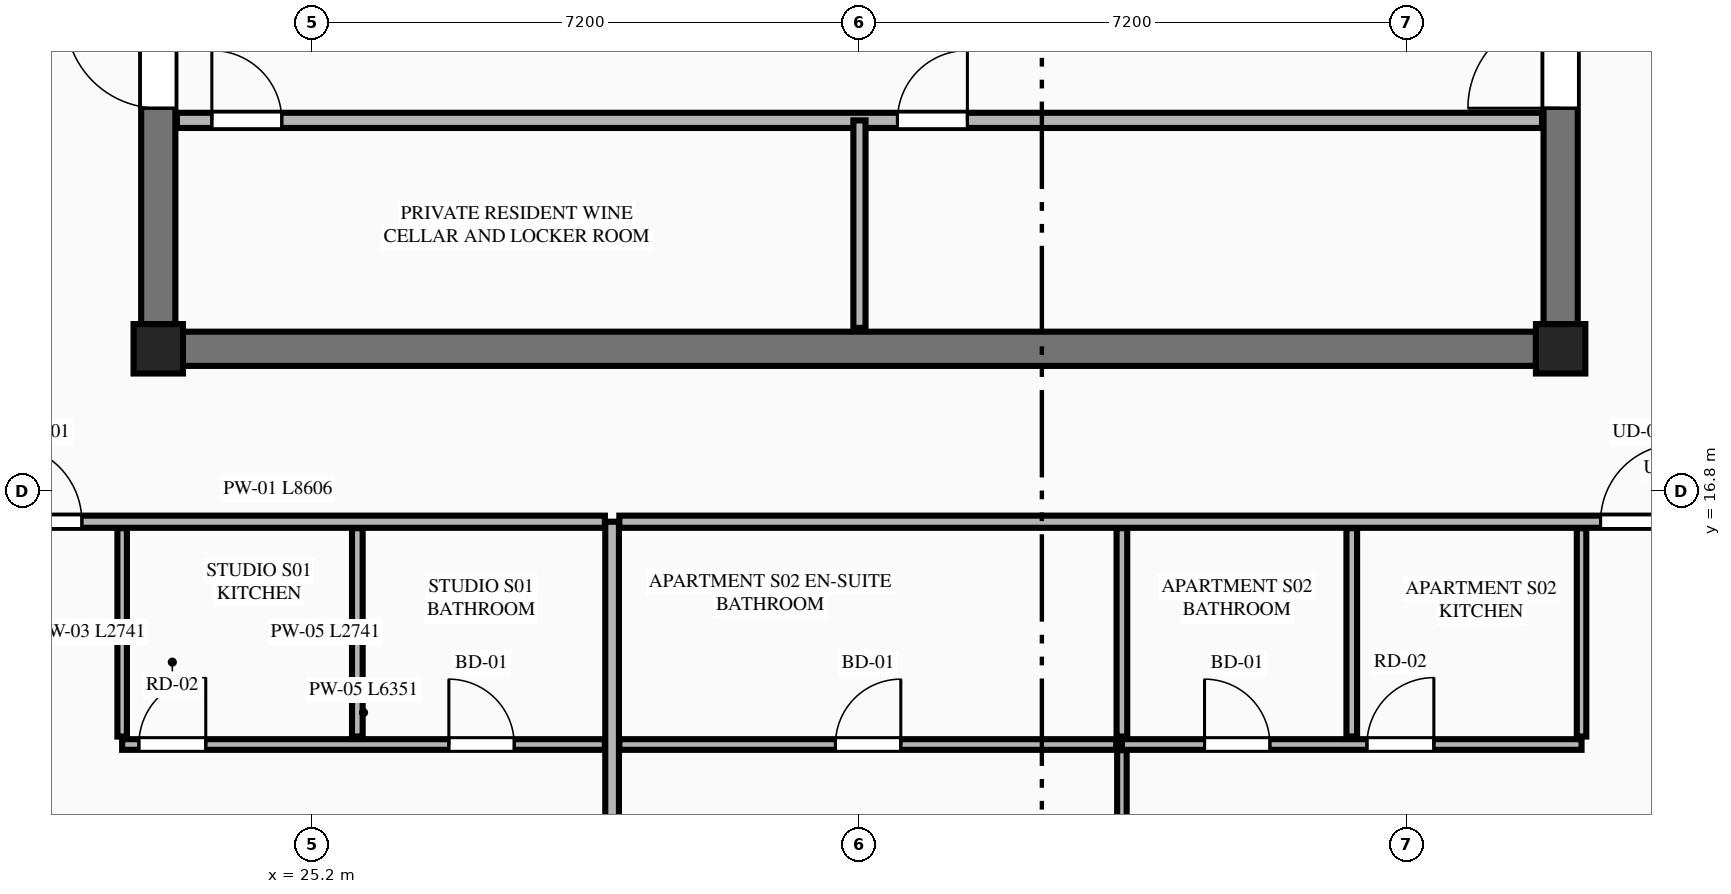
"""IFC4 building model, lengths in metres.
Left out: names, types, materials, properties, quantities, classifications, styles, units other than length and angle.
Written with IfcOpenShell. Run it as: python <this file> out.ifc"""

import sys

from ifc_helpers import new_model, si_unit, direction, frame, frame_2d, origin, origin_2d, place, context, subcontext, project, spatial, rectangle, extrude, element, fill, save


model = new_model("IFC4")
c1 = context("Model", 3, precision=1e-05, world=origin(), true_north=direction((0.0, 1.0)))
c2 = subcontext(c1, "Body", "Model", "MODEL_VIEW")
j1 = project(units=[si_unit("LENGTHUNIT", "METRE"), si_unit("PLANEANGLEUNIT", "RADIAN")], contexts=[c1])
p1 = place(None, origin())
s1 = spatial("IfcSite", under=j1, at=p1, CompositionType="ELEMENT")
p2 = place(p1, origin())
s2 = spatial("IfcBuilding", under=s1, at=p2, CompositionType="ELEMENT")
p3 = place(p2, frame((0.0, 0.0, 283.5)))
s3 = spatial("IfcBuildingStorey", under=s2, at=p3, CompositionType="ELEMENT", Elevation=283.5)
for number, where, z_axis, x_axis in (
    (1, (23.175, 18.675, 0.0), (0.0, 0.0, 1.0), (1.0, 0.0, 0.0)),
    (2, (41.625, 18.675, 0.0), (0.0, 0.0, 1.0), (1.0, 0.0, 0.0)),
):
    element("IfcColumn", number, at=place(p3, frame(where, z_axis=z_axis, x_axis=x_axis)), inside=s3, PredefinedType="COLUMN", context=c2, shape_type="SweptSolid", body=[
        extrude(rectangle(XDim=0.65, YDim=0.65, at=origin_2d()), origin(), (0.0, 0.0, 1.0), 4.0),
    ])
p4 = place(p3, frame((23.5, 18.675, 0.0), z_axis=(0.0, 0.0, 1.0), x_axis=(1.0, 0.0, 0.0)))
e3 = element("IfcWall", 3, at=p4, inside=s3, PredefinedType="SHEAR", context=c2, shape_type="SweptSolid", body=[
    extrude(rectangle(XDim=17.8, YDim=0.45, at=frame_2d((8.9, 0.0))), origin(), (0.0, 0.0, 1.0), 3.8),
])
p5 = place(p3, frame((23.175, 19.0, 0.0), z_axis=(0.0, 0.0, 1.0), x_axis=(0.0, 1.0, 0.0)))
e4 = element("IfcWall", 4, at=p5, inside=s3, PredefinedType="SHEAR", context=c2, shape_type="SweptSolid", body=[
    extrude(rectangle(XDim=13.8, YDim=0.45, at=frame_2d((6.9, 0.0))), origin(), (0.0, 0.0, 1.0), 3.8),
])
p6 = place(p5, frame((2.84, 0.0, 0.0)))
e5 = element("IfcOpeningElement", 5, at=p6, cuts=e4, PredefinedType="OPENING", context=c2, shape_type="SweptSolid", body=[
    extrude(rectangle(XDim=1.22, YDim=2.25, at=frame_2d((0.61, 1.125))), frame((0.0, 0.235, 0.0), z_axis=(0.0, -1.0, 0.0), x_axis=(1.0, 0.0, 0.0)), (0.0, 0.0, 1.0), 0.47),
])
p7 = place(p3, frame((41.625, 19.0, 0.0), z_axis=(0.0, 0.0, 1.0), x_axis=(0.0, 1.0, 0.0)))
e6 = element("IfcWall", 6, at=p7, inside=s3, PredefinedType="SHEAR", context=c2, shape_type="SweptSolid", body=[
    extrude(rectangle(XDim=13.8, YDim=0.45, at=frame_2d((6.9, 0.0))), origin(), (0.0, 0.0, 1.0), 3.8),
])
p8 = place(p7, frame((2.84, 0.0, 0.0)))
e7 = element("IfcOpeningElement", 7, at=p8, cuts=e6, PredefinedType="OPENING", context=c2, shape_type="SweptSolid", body=[
    extrude(rectangle(XDim=1.22, YDim=2.25, at=frame_2d((0.61, 1.125))), frame((0.0, 0.235, 0.0), z_axis=(0.0, -1.0, 0.0), x_axis=(1.0, 0.0, 0.0)), (0.0, 0.0, 1.0), 0.47),
])
p9 = place(p3, frame((23.42, 21.68, 0.0), z_axis=(0.0, 0.0, 1.0), x_axis=(1.0, 0.0, 0.0)))
e8 = element("IfcWall", 8, at=p9, inside=s3, PredefinedType="PLUMBINGWALL", context=c2, shape_type="SweptSolid", body=[
    extrude(rectangle(XDim=17.96, YDim=0.2, at=frame_2d((8.98, 0.0))), origin(), (0.0, 0.0, 1.0), 3.8),
])
p10 = place(p9, frame((0.46, 0.0, 0.0)))
e9 = element("IfcOpeningElement", 9, at=p10, cuts=e8, PredefinedType="OPENING", context=c2, shape_type="SweptSolid", body=[
    extrude(rectangle(XDim=0.92, YDim=2.15, at=frame_2d((0.46, 1.075))), frame((0.0, 0.11, 0.0), z_axis=(0.0, -1.0, 0.0), x_axis=(1.0, 0.0, 0.0)), (0.0, 0.0, 1.0), 0.22),
])
p11 = place(p9, frame((9.48, 0.0, 0.0)))
e10 = element("IfcOpeningElement", 10, at=p11, cuts=e8, PredefinedType="OPENING", context=c2, shape_type="SweptSolid", body=[
    extrude(rectangle(XDim=0.92, YDim=2.15, at=frame_2d((0.46, 1.075))), frame((0.0, 0.11, 0.0), z_axis=(0.0, -1.0, 0.0), x_axis=(1.0, 0.0, 0.0)), (0.0, 0.0, 1.0), 0.22),
])
p12 = place(p3, frame((32.4, 18.95, 0.0), z_axis=(0.0, 0.0, 1.0), x_axis=(0.0, 1.0, 0.0)))
e11 = element("IfcWall", 11, at=p12, inside=s3, PredefinedType="PARTITIONING", context=c2, shape_type="SweptSolid", body=[
    extrude(rectangle(XDim=2.73, YDim=0.16, at=frame_2d((1.365, 0.0))), origin(), (0.0, 0.0, 1.0), 3.8),
])
p13 = place(p3, frame((29.146, 7.405, 0.0), z_axis=(0.0, 0.0, 1.0), x_axis=(0.0, 1.0, 0.0)))
e12 = element("IfcWall", 12, at=p13, inside=s3, PredefinedType="PARTITIONING", context=c2, shape_type="SweptSolid", body=[
    extrude(rectangle(XDim=8.995, YDim=0.18, at=frame_2d((4.498, 0.0))), origin(), (0.0, 0.0, 1.0), 3.257),
])
p14 = place(p3, frame((20.445, 16.4, 0.0), z_axis=(0.0, 0.0, 1.0), x_axis=(1.0, 0.0, 0.0)))
e13 = element("IfcWall", 13, at=p14, inside=s3, PredefinedType="PARTITIONING", context=c2, shape_type="SweptSolid", body=[
    extrude(rectangle(XDim=8.606, YDim=0.16, at=frame_2d((4.303, 0.0))), origin(), (0.0, 0.0, 1.0), 3.8),
])
p15 = place(p14, frame((0.705, 0.0, 0.0)))
e14 = element("IfcOpeningElement", 14, at=p15, cuts=e13, PredefinedType="OPENING", context=c2, shape_type="SweptSolid", body=[
    extrude(rectangle(XDim=1.02, YDim=2.25, at=frame_2d((0.51, 1.125))), frame((0.0, 0.09, 0.0), z_axis=(0.0, -1.0, 0.0), x_axis=(1.0, 0.0, 0.0)), (0.0, 0.0, 1.0), 0.18),
])
p16 = place(p3, frame((22.7, 13.574, 0.0), z_axis=(0.0, 0.0, 1.0), x_axis=(0.0, 1.0, 0.0)))
e15 = element("IfcWall", 15, at=p16, inside=s3, PredefinedType="PARTITIONING", context=c2, shape_type="SweptSolid", body=[
    extrude(rectangle(XDim=2.741, YDim=0.125, at=frame_2d((1.371, 0.0))), origin(), (0.0, 0.0, 1.0), 3.257),
])
p17 = place(p3, frame((22.7, 13.469, 0.0), z_axis=(0.0, 0.0, 1.0), x_axis=(1.0, 0.0, 0.0)))
e16 = element("IfcWall", 16, at=p17, inside=s3, PredefinedType="PLUMBINGWALL", context=c2, shape_type="SweptSolid", body=[
    extrude(rectangle(XDim=6.351, YDim=0.14, at=frame_2d((3.176, 0.0))), origin(), (0.0, 0.0, 1.0), 3.8),
])
p18 = place(p17, frame((4.298, 0.0, 0.0)))
e17 = element("IfcOpeningElement", 17, at=p18, cuts=e16, PredefinedType="OPENING", context=c2, shape_type="SweptSolid", body=[
    extrude(rectangle(XDim=0.86, YDim=2.1, at=frame_2d((0.43, 1.05))), frame((0.0, 0.08, 0.0), z_axis=(0.0, -1.0, 0.0), x_axis=(1.0, 0.0, 0.0)), (0.0, 0.0, 1.0), 0.16),
])
p19 = place(p17, frame((0.22, 0.0, 0.0)))
e18 = element("IfcOpeningElement", 18, at=p19, cuts=e16, PredefinedType="OPENING", context=c2, shape_type="SweptSolid", body=[
    extrude(rectangle(XDim=0.88, YDim=2.15, at=frame_2d((0.44, 1.075))), frame((0.0, 0.08, 0.0), z_axis=(0.0, -1.0, 0.0), x_axis=(1.0, 0.0, 0.0)), (0.0, 0.0, 1.0), 0.16),
])
p20 = place(p3, frame((25.794, 13.574, 0.0), z_axis=(0.0, 0.0, 1.0), x_axis=(0.0, 1.0, 0.0)))
e19 = element("IfcWall", 19, at=p20, inside=s3, PredefinedType="PLUMBINGWALL", context=c2, shape_type="SweptSolid", body=[
    extrude(rectangle(XDim=2.741, YDim=0.14, at=frame_2d((1.371, 0.0))), origin(), (0.0, 0.0, 1.0), 3.8),
])
p21 = place(p3, frame((29.241, 16.4, 0.0), z_axis=(0.0, 0.0, 1.0), x_axis=(1.0, 0.0, 0.0)))
e20 = element("IfcWall", 20, at=p21, inside=s3, PredefinedType="PARTITIONING", context=c2, shape_type="SweptSolid", body=[
    extrude(rectangle(XDim=15.114, YDim=0.16, at=frame_2d((7.557, 0.0))), origin(), (0.0, 0.0, 1.0), 3.8),
])
p22 = place(p21, frame((12.909, 0.0, 0.0)))
e21 = element("IfcOpeningElement", 21, at=p22, cuts=e20, PredefinedType="OPENING", context=c2, shape_type="SweptSolid", body=[
    extrude(rectangle(XDim=1.02, YDim=2.25, at=frame_2d((0.51, 1.125))), frame((0.0, 0.09, 0.0), z_axis=(0.0, -1.0, 0.0), x_axis=(1.0, 0.0, 0.0)), (0.0, 0.0, 1.0), 0.18),
])
p23 = place(p3, frame((41.9, 13.574, 0.0), z_axis=(0.0, 0.0, 1.0), x_axis=(0.0, 1.0, 0.0)))
e22 = element("IfcWall", 22, at=p23, inside=s3, PredefinedType="PARTITIONING", context=c2, shape_type="SweptSolid", body=[
    extrude(rectangle(XDim=2.741, YDim=0.125, at=frame_2d((1.371, 0.0))), origin(), (0.0, 0.0, 1.0), 3.257),
])
p24 = place(p3, frame((35.853, 13.469, 0.0), z_axis=(0.0, 0.0, 1.0), x_axis=(1.0, 0.0, 0.0)))
e23 = element("IfcWall", 23, at=p24, inside=s3, PredefinedType="PLUMBINGWALL", context=c2, shape_type="SweptSolid", body=[
    extrude(rectangle(XDim=6.047, YDim=0.14, at=frame_2d((3.023, 0.0))), origin(), (0.0, 0.0, 1.0), 3.8),
])
p25 = place(p24, frame((1.087, 0.0, 0.0)))
e24 = element("IfcOpeningElement", 24, at=p25, cuts=e23, PredefinedType="OPENING", context=c2, shape_type="SweptSolid", body=[
    extrude(rectangle(XDim=0.86, YDim=2.1, at=frame_2d((0.43, 1.05))), frame((0.0, 0.08, 0.0), z_axis=(0.0, -1.0, 0.0), x_axis=(1.0, 0.0, 0.0)), (0.0, 0.0, 1.0), 0.16),
])
p26 = place(p24, frame((3.224, 0.0, 0.0)))
e25 = element("IfcOpeningElement", 25, at=p26, cuts=e23, PredefinedType="OPENING", context=c2, shape_type="SweptSolid", body=[
    extrude(rectangle(XDim=0.88, YDim=2.15, at=frame_2d((0.44, 1.075))), frame((0.0, 0.08, 0.0), z_axis=(0.0, -1.0, 0.0), x_axis=(1.0, 0.0, 0.0)), (0.0, 0.0, 1.0), 0.16),
])
p27 = place(p3, frame((29.241, 13.469, 0.0), z_axis=(0.0, 0.0, 1.0), x_axis=(1.0, 0.0, 0.0)))
e26 = element("IfcWall", 26, at=p27, inside=s3, PredefinedType="PLUMBINGWALL", context=c2, shape_type="SweptSolid", body=[
    extrude(rectangle(XDim=6.537, YDim=0.14, at=frame_2d((3.269, 0.0))), origin(), (0.0, 0.0, 1.0), 3.8),
])
p28 = place(p27, frame((2.843, 0.0, 0.0)))
e27 = element("IfcOpeningElement", 27, at=p28, cuts=e26, PredefinedType="OPENING", context=c2, shape_type="SweptSolid", body=[
    extrude(rectangle(XDim=0.86, YDim=2.1, at=frame_2d((0.43, 1.05))), frame((0.0, 0.08, 0.0), z_axis=(0.0, -1.0, 0.0), x_axis=(1.0, 0.0, 0.0)), (0.0, 0.0, 1.0), 0.16),
])
for number, where, z_axis, x_axis in (
    (28, (38.877, 13.574, 0.0), (0.0, 0.0, 1.0), (0.0, 1.0, 0.0)),
    (29, (35.853, 13.574, 0.0), (0.0, 0.0, 1.0), (0.0, 1.0, 0.0)),
):
    element("IfcWall", number, at=place(p3, frame(where, z_axis=z_axis, x_axis=x_axis)), inside=s3, PredefinedType="PLUMBINGWALL", context=c2, shape_type="SweptSolid", body=[
        extrude(rectangle(XDim=2.741, YDim=0.14, at=frame_2d((1.371, 0.0))), origin(), (0.0, 0.0, 1.0), 3.8),
    ])
p29 = place(p3, frame((35.853, 7.315, 0.0), z_axis=(0.0, 0.0, 1.0), x_axis=(0.0, 1.0, 0.0)))
e30 = element("IfcWall", 30, at=p29, inside=s3, PredefinedType="PARTITIONING", context=c2, shape_type="SweptSolid", body=[
    extrude(rectangle(XDim=6.079, YDim=0.125, at=frame_2d((3.04, 0.0))), origin(), (0.0, 0.0, 1.0), 3.8),
])
p30 = place(p29, frame((1.05, 0.0, 0.0)))
e31 = element("IfcOpeningElement", 31, at=p30, cuts=e30, PredefinedType="OPENING", context=c2, shape_type="SweptSolid", body=[
    extrude(rectangle(XDim=0.92, YDim=2.15, at=frame_2d((0.46, 1.075))), frame((0.0, 0.073, 0.0), z_axis=(0.0, -1.0, 0.0), x_axis=(1.0, 0.0, 0.0)), (0.0, 0.0, 1.0), 0.145),
])
p31 = place(p6, origin())
e32 = element("IfcDoor", 32, at=p31, inside=s3, OperationType="SINGLE_SWING_RIGHT", PredefinedType="DOOR", context=c2, shape_type="SweptSolid", body=[
    extrude(rectangle(XDim=1.22, YDim=2.25, at=frame_2d((0.61, 1.125))), frame((0.0, 0.025, 0.0), z_axis=(0.0, -1.0, 0.0), x_axis=(1.0, 0.0, 0.0)), (0.0, 0.0, 1.0), 0.05),
])
fill(e5, e32)
p32 = place(p8, origin())
e33 = element("IfcDoor", 33, at=p32, inside=s3, OperationType="SINGLE_SWING_LEFT", PredefinedType="DOOR", context=c2, shape_type="SweptSolid", body=[
    extrude(rectangle(XDim=1.22, YDim=2.25, at=frame_2d((0.61, 1.125))), frame((0.0, 0.025, 0.0), z_axis=(0.0, -1.0, 0.0), x_axis=(1.0, 0.0, 0.0)), (0.0, 0.0, 1.0), 0.05),
])
fill(e7, e33)
p33 = place(p10, origin())
e34 = element("IfcDoor", 34, at=p33, inside=s3, OperationType="SINGLE_SWING_LEFT", PredefinedType="DOOR", context=c2, shape_type="SweptSolid", body=[
    extrude(rectangle(XDim=0.92, YDim=2.15, at=frame_2d((0.46, 1.075))), frame((0.0, 0.025, 0.0), z_axis=(0.0, -1.0, 0.0), x_axis=(1.0, 0.0, 0.0)), (0.0, 0.0, 1.0), 0.05),
])
fill(e9, e34)
p34 = place(p11, origin())
e35 = element("IfcDoor", 35, at=p34, inside=s3, OperationType="SINGLE_SWING_RIGHT", PredefinedType="DOOR", context=c2, shape_type="SweptSolid", body=[
    extrude(rectangle(XDim=0.92, YDim=2.15, at=frame_2d((0.46, 1.075))), frame((0.0, 0.025, 0.0), z_axis=(0.0, -1.0, 0.0), x_axis=(1.0, 0.0, 0.0)), (0.0, 0.0, 1.0), 0.05),
])
fill(e10, e35)
p35 = place(p18, origin())
e36 = element("IfcDoor", 36, at=p35, inside=s3, OperationType="SINGLE_SWING_LEFT", PredefinedType="DOOR", context=c2, shape_type="SweptSolid", body=[
    extrude(rectangle(XDim=0.86, YDim=2.1, at=frame_2d((0.43, 1.05))), frame((0.0, 0.025, 0.0), z_axis=(0.0, -1.0, 0.0), x_axis=(1.0, 0.0, 0.0)), (0.0, 0.0, 1.0), 0.05),
])
fill(e17, e36)
p36 = place(p15, origin())
e37 = element("IfcDoor", 37, at=p36, inside=s3, OperationType="SINGLE_SWING_LEFT", PredefinedType="DOOR", context=c2, shape_type="SweptSolid", body=[
    extrude(rectangle(XDim=1.02, YDim=2.25, at=frame_2d((0.51, 1.125))), frame((0.0, 0.025, 0.0), z_axis=(0.0, -1.0, 0.0), x_axis=(1.0, 0.0, 0.0)), (0.0, 0.0, 1.0), 0.05),
])
fill(e14, e37)
p37 = place(p19, origin())
e38 = element("IfcDoor", 38, at=p37, inside=s3, OperationType="SINGLE_SWING_RIGHT", PredefinedType="DOOR", context=c2, shape_type="SweptSolid", body=[
    extrude(rectangle(XDim=0.88, YDim=2.15, at=frame_2d((0.44, 1.075))), frame((0.0, 0.025, 0.0), z_axis=(0.0, -1.0, 0.0), x_axis=(1.0, 0.0, 0.0)), (0.0, 0.0, 1.0), 0.05),
])
fill(e18, e38)
p38 = place(p25, origin())
e39 = element("IfcDoor", 39, at=p38, inside=s3, OperationType="SINGLE_SWING_LEFT", PredefinedType="DOOR", context=c2, shape_type="SweptSolid", body=[
    extrude(rectangle(XDim=0.86, YDim=2.1, at=frame_2d((0.43, 1.05))), frame((0.0, 0.025, 0.0), z_axis=(0.0, -1.0, 0.0), x_axis=(1.0, 0.0, 0.0)), (0.0, 0.0, 1.0), 0.05),
])
fill(e24, e39)
p39 = place(p28, origin())
e40 = element("IfcDoor", 40, at=p39, inside=s3, OperationType="SINGLE_SWING_RIGHT", PredefinedType="DOOR", context=c2, shape_type="SweptSolid", body=[
    extrude(rectangle(XDim=0.86, YDim=2.1, at=frame_2d((0.43, 1.05))), frame((0.0, 0.025, 0.0), z_axis=(0.0, -1.0, 0.0), x_axis=(1.0, 0.0, 0.0)), (0.0, 0.0, 1.0), 0.05),
])
fill(e27, e40)
p40 = place(p22, origin())
e41 = element("IfcDoor", 41, at=p40, inside=s3, OperationType="SINGLE_SWING_RIGHT", PredefinedType="DOOR", context=c2, shape_type="SweptSolid", body=[
    extrude(rectangle(XDim=1.02, YDim=2.25, at=frame_2d((0.51, 1.125))), frame((0.0, 0.025, 0.0), z_axis=(0.0, -1.0, 0.0), x_axis=(1.0, 0.0, 0.0)), (0.0, 0.0, 1.0), 0.05),
])
fill(e21, e41)
p41 = place(p26, origin())
e42 = element("IfcDoor", 42, at=p41, inside=s3, OperationType="SINGLE_SWING_RIGHT", PredefinedType="DOOR", context=c2, shape_type="SweptSolid", body=[
    extrude(rectangle(XDim=0.88, YDim=2.15, at=frame_2d((0.44, 1.075))), frame((0.0, 0.025, 0.0), z_axis=(0.0, -1.0, 0.0), x_axis=(1.0, 0.0, 0.0)), (0.0, 0.0, 1.0), 0.05),
])
fill(e25, e42)
save(model, sys.argv[1])
